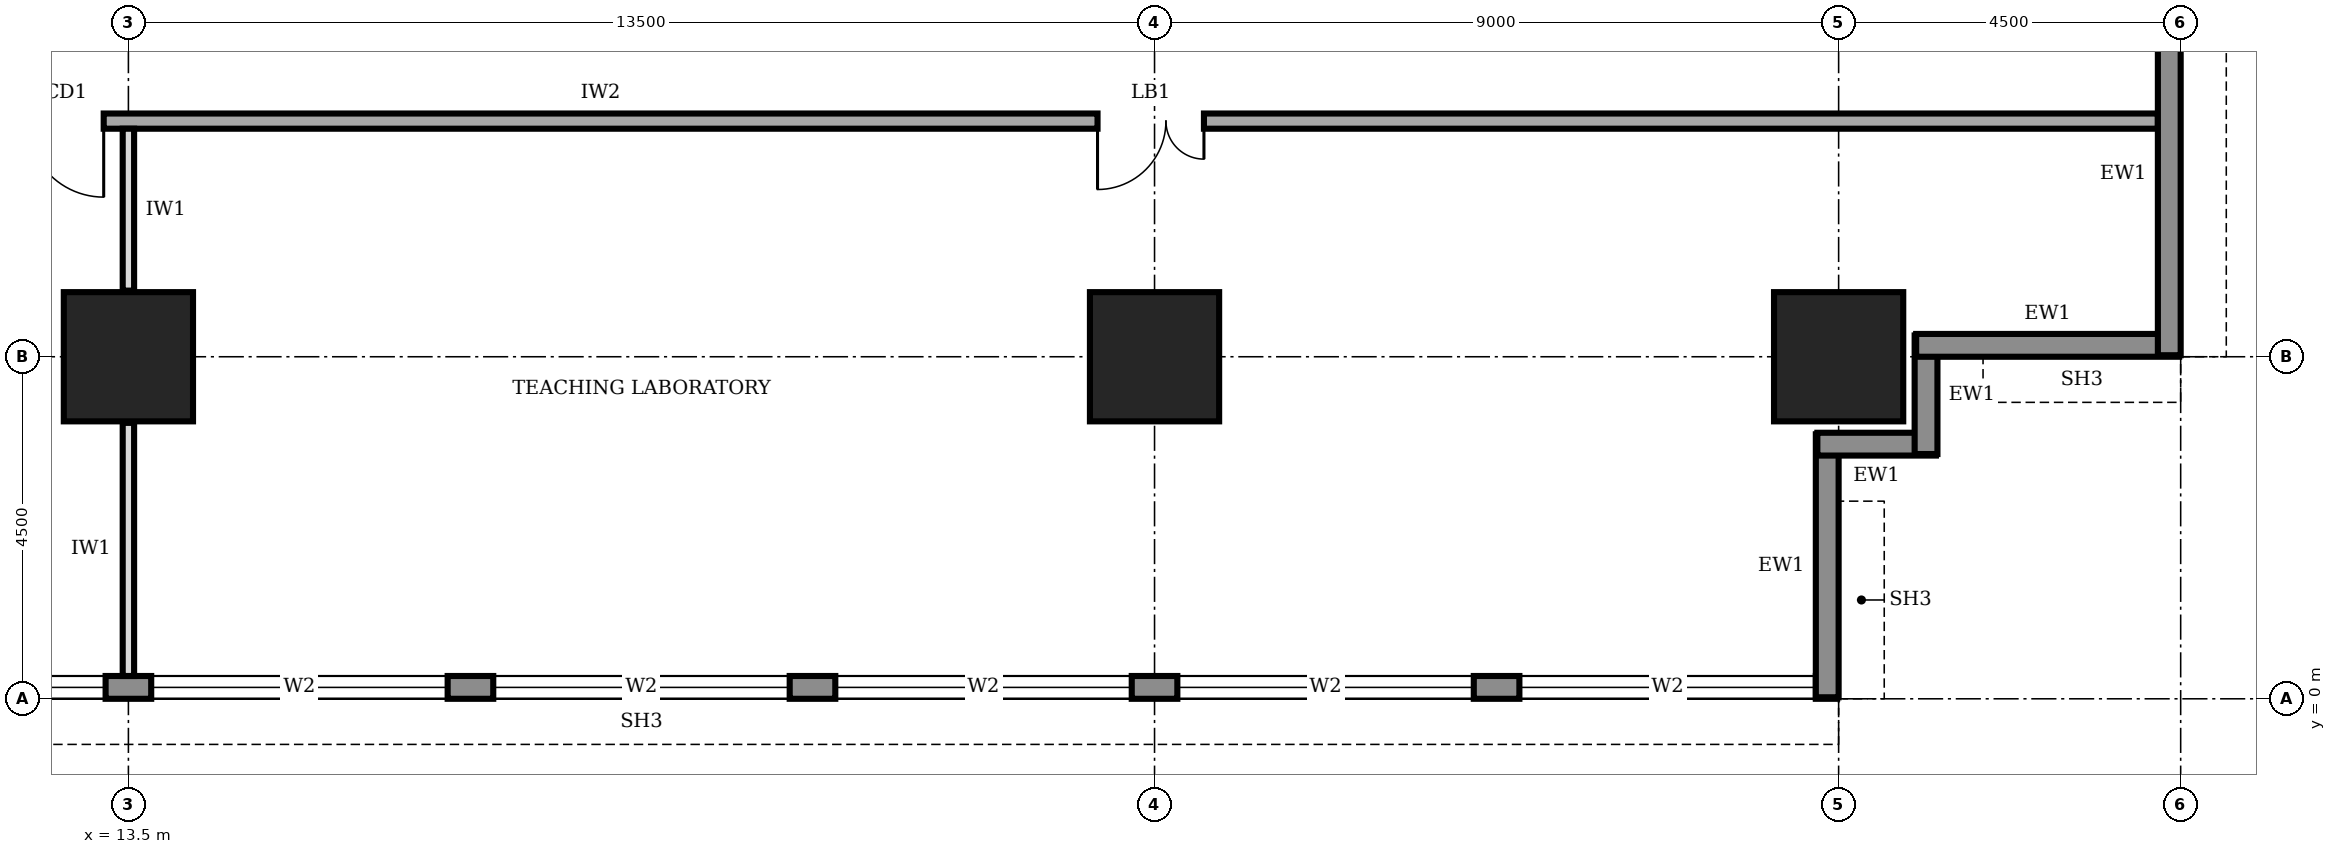
"""IFC4 building model, lengths in metres.
Left out: names, types, materials, properties, quantities, classifications, styles, units other than length and angle.
Written with IfcOpenShell. Run it as: python <this file> out.ifc"""

import sys

from ifc_helpers import new_model, si_unit, direction, frame, frame_2d, origin, origin_2d, place, context, subcontext, project, spatial, rectangle, extrude, element, fill, save


model = new_model("IFC4")
c1 = context("Model", 3, precision=1e-05, world=origin(), true_north=direction((0.0, 1.0)))
c2 = subcontext(c1, "Body", "Model", "MODEL_VIEW")
j1 = project(units=[si_unit("LENGTHUNIT", "METRE"), si_unit("PLANEANGLEUNIT", "RADIAN")], contexts=[c1])
p1 = place(None, origin())
s1 = spatial("IfcSite", under=j1, at=p1, CompositionType="ELEMENT")
p2 = place(p1, origin())
s2 = spatial("IfcBuilding", under=s1, at=p2, CompositionType="ELEMENT")
p3 = place(p2, frame((0.0, 0.0, 149.0)))
s3 = spatial("IfcBuildingStorey", under=s2, at=p3, CompositionType="ELEMENT", Elevation=149.0)
for number, where, z_axis, x_axis in (
    (1, (13.5, 4.5, 0.0), (0.0, 0.0, 1.0), (1.0, 0.0, 0.0)),
    (2, (27.0, 4.5, 0.0), (0.0, 0.0, 1.0), (1.0, 0.0, 0.0)),
    (3, (36.0, 4.5, 0.0), (0.0, 0.0, 1.0), (1.0, 0.0, 0.0)),
):
    element("IfcColumn", number, at=place(p3, frame(where, z_axis=z_axis, x_axis=x_axis)), inside=s3, PredefinedType="COLUMN", context=c2, shape_type="SweptSolid", body=[
        extrude(rectangle(XDim=1.7, YDim=1.7, at=origin_2d()), origin(), (0.0, 0.0, 1.0), 4.0),
    ])
p4 = place(p3, frame((4.52, 0.15, 0.0), z_axis=(0.0, 0.0, 1.0), x_axis=(1.0, 0.0, 0.0)))
e4 = element("IfcWall", 4, at=p4, inside=s3, PredefinedType="STANDARD", context=c2, shape_type="SweptSolid", body=[
    extrude(rectangle(XDim=31.46, YDim=0.3, at=frame_2d((15.73, 0.0))), origin(), (0.0, 0.0, 1.0), 3.75),
])
p5 = place(p4, frame((4.78, 0.0, 0.6)))
e5 = element("IfcOpeningElement", 5, at=p5, cuts=e4, PredefinedType="OPENING", context=c2, shape_type="SweptSolid", body=[
    extrude(rectangle(XDim=3.9, YDim=2.6, at=frame_2d((1.95, 1.3))), frame((0.0, 0.16, 0.0), z_axis=(0.0, -1.0, 0.0), x_axis=(1.0, 0.0, 0.0)), (0.0, 0.0, 1.0), 0.32),
])
p6 = place(p4, frame((9.28, 0.0, 0.6)))
e6 = element("IfcOpeningElement", 6, at=p6, cuts=e4, PredefinedType="OPENING", context=c2, shape_type="SweptSolid", body=[
    extrude(rectangle(XDim=3.9, YDim=2.6, at=frame_2d((1.95, 1.3))), frame((0.0, 0.16, 0.0), z_axis=(0.0, -1.0, 0.0), x_axis=(1.0, 0.0, 0.0)), (0.0, 0.0, 1.0), 0.32),
])
p7 = place(p4, frame((13.78, 0.0, 0.6)))
e7 = element("IfcOpeningElement", 7, at=p7, cuts=e4, PredefinedType="OPENING", context=c2, shape_type="SweptSolid", body=[
    extrude(rectangle(XDim=3.9, YDim=2.6, at=frame_2d((1.95, 1.3))), frame((0.0, 0.16, 0.0), z_axis=(0.0, -1.0, 0.0), x_axis=(1.0, 0.0, 0.0)), (0.0, 0.0, 1.0), 0.32),
])
p8 = place(p4, frame((18.28, 0.0, 0.6)))
e8 = element("IfcOpeningElement", 8, at=p8, cuts=e4, PredefinedType="OPENING", context=c2, shape_type="SweptSolid", body=[
    extrude(rectangle(XDim=3.9, YDim=2.6, at=frame_2d((1.95, 1.3))), frame((0.0, 0.16, 0.0), z_axis=(0.0, -1.0, 0.0), x_axis=(1.0, 0.0, 0.0)), (0.0, 0.0, 1.0), 0.32),
])
p9 = place(p4, frame((22.78, 0.0, 0.6)))
e9 = element("IfcOpeningElement", 9, at=p9, cuts=e4, PredefinedType="OPENING", context=c2, shape_type="SweptSolid", body=[
    extrude(rectangle(XDim=3.9, YDim=2.6, at=frame_2d((1.95, 1.3))), frame((0.0, 0.16, 0.0), z_axis=(0.0, -1.0, 0.0), x_axis=(1.0, 0.0, 0.0)), (0.0, 0.0, 1.0), 0.32),
])
p10 = place(p4, frame((27.28, 0.0, 0.6)))
e10 = element("IfcOpeningElement", 10, at=p10, cuts=e4, PredefinedType="OPENING", context=c2, shape_type="SweptSolid", body=[
    extrude(rectangle(XDim=3.9, YDim=2.6, at=frame_2d((1.95, 1.3))), frame((0.0, 0.16, 0.0), z_axis=(0.0, -1.0, 0.0), x_axis=(1.0, 0.0, 0.0)), (0.0, 0.0, 1.0), 0.32),
])
p11 = place(p3, frame((35.85, 0.02, 0.0), z_axis=(0.0, 0.0, 1.0), x_axis=(0.0, 1.0, 0.0)))
e11 = element("IfcWall", 11, at=p11, inside=s3, PredefinedType="STANDARD", context=c2, shape_type="SweptSolid", body=[
    extrude(rectangle(XDim=3.46, YDim=0.3, at=frame_2d((1.73, 0.0))), origin(), (0.0, 0.0, 1.0), 2.85),
])
for number, where, z_axis, x_axis in (
    (12, (35.72, 3.35, 0.0), (0.0, 0.0, 1.0), (1.0, 0.0, 0.0)),
    (13, (37.15, 3.22, 0.0), (0.0, 0.0, 1.0), (0.0, 1.0, 0.0)),
):
    element("IfcWall", number, at=place(p3, frame(where, z_axis=z_axis, x_axis=x_axis)), inside=s3, PredefinedType="STANDARD", context=c2, shape_type="SweptSolid", body=[
        extrude(rectangle(XDim=1.56, YDim=0.3, at=frame_2d((0.78, 0.0))), origin(), (0.0, 0.0, 1.0), 3.75),
    ])
p12 = place(p3, frame((37.02, 4.65, 0.0), z_axis=(0.0, 0.0, 1.0), x_axis=(1.0, 0.0, 0.0)))
e14 = element("IfcWall", 14, at=p12, inside=s3, PredefinedType="STANDARD", context=c2, shape_type="SweptSolid", body=[
    extrude(rectangle(XDim=3.46, YDim=0.3, at=frame_2d((1.73, 0.0))), origin(), (0.0, 0.0, 1.0), 2.85),
])
p13 = place(p3, frame((40.35, 4.52, 0.0), z_axis=(0.0, 0.0, 1.0), x_axis=(0.0, 1.0, 0.0)))
e15 = element("IfcWall", 15, at=p13, inside=s3, PredefinedType="STANDARD", context=c2, shape_type="SweptSolid", body=[
    extrude(rectangle(XDim=31.46, YDim=0.3, at=frame_2d((15.73, 0.0))), origin(), (0.0, 0.0, 1.0), 3.75),
])
p14 = place(p13, frame((4.78, 0.0, 0.6)))
e16 = element("IfcOpeningElement", 16, at=p14, cuts=e15, PredefinedType="OPENING", context=c2, shape_type="SweptSolid", body=[
    extrude(rectangle(XDim=3.9, YDim=2.6, at=frame_2d((1.95, 1.3))), frame((0.0, 0.16, 0.0), z_axis=(0.0, -1.0, 0.0), x_axis=(1.0, 0.0, 0.0)), (0.0, 0.0, 1.0), 0.32),
])
p15 = place(p13, frame((9.28, 0.0, 0.6)))
e17 = element("IfcOpeningElement", 17, at=p15, cuts=e15, PredefinedType="OPENING", context=c2, shape_type="SweptSolid", body=[
    extrude(rectangle(XDim=3.9, YDim=2.6, at=frame_2d((1.95, 1.3))), frame((0.0, 0.16, 0.0), z_axis=(0.0, -1.0, 0.0), x_axis=(1.0, 0.0, 0.0)), (0.0, 0.0, 1.0), 0.32),
])
p16 = place(p13, frame((13.78, 0.0, 0.6)))
e18 = element("IfcOpeningElement", 18, at=p16, cuts=e15, PredefinedType="OPENING", context=c2, shape_type="SweptSolid", body=[
    extrude(rectangle(XDim=3.9, YDim=2.6, at=frame_2d((1.95, 1.3))), frame((0.0, 0.16, 0.0), z_axis=(0.0, -1.0, 0.0), x_axis=(1.0, 0.0, 0.0)), (0.0, 0.0, 1.0), 0.32),
])
p17 = place(p13, frame((18.28, 0.0, 0.6)))
e19 = element("IfcOpeningElement", 19, at=p17, cuts=e15, PredefinedType="OPENING", context=c2, shape_type="SweptSolid", body=[
    extrude(rectangle(XDim=3.9, YDim=2.6, at=frame_2d((1.95, 1.3))), frame((0.0, 0.16, 0.0), z_axis=(0.0, -1.0, 0.0), x_axis=(1.0, 0.0, 0.0)), (0.0, 0.0, 1.0), 0.32),
])
p18 = place(p13, frame((22.78, 0.0, 0.6)))
e20 = element("IfcOpeningElement", 20, at=p18, cuts=e15, PredefinedType="OPENING", context=c2, shape_type="SweptSolid", body=[
    extrude(rectangle(XDim=3.9, YDim=2.6, at=frame_2d((1.95, 1.3))), frame((0.0, 0.16, 0.0), z_axis=(0.0, -1.0, 0.0), x_axis=(1.0, 0.0, 0.0)), (0.0, 0.0, 1.0), 0.32),
])
p19 = place(p13, frame((27.28, 0.0, 0.6)))
e21 = element("IfcOpeningElement", 21, at=p19, cuts=e15, PredefinedType="OPENING", context=c2, shape_type="SweptSolid", body=[
    extrude(rectangle(XDim=3.9, YDim=2.6, at=frame_2d((1.95, 1.3))), frame((0.0, 0.16, 0.0), z_axis=(0.0, -1.0, 0.0), x_axis=(1.0, 0.0, 0.0)), (0.0, 0.0, 1.0), 0.32),
])
p20 = place(p3, frame((11.9, 7.6, 0.0), z_axis=(0.0, 0.0, 1.0), x_axis=(1.0, 0.0, 0.0)))
e22 = element("IfcWall", 22, at=p20, inside=s3, PredefinedType="SOLIDWALL", context=c2, shape_type="SweptSolid", body=[
    extrude(rectangle(XDim=28.3, YDim=0.2, at=frame_2d((14.15, 0.0))), origin(), (0.0, 0.0, 1.0), 3.75),
])
p21 = place(p20, frame((0.275, 0.0, 0.0)))
e23 = element("IfcOpeningElement", 23, at=p21, cuts=e22, PredefinedType="OPENING", context=c2, shape_type="SweptSolid", body=[
    extrude(rectangle(XDim=1.0, YDim=2.1, at=frame_2d((0.5, 1.05))), frame((0.0, 0.11, 0.0), z_axis=(0.0, -1.0, 0.0), x_axis=(1.0, 0.0, 0.0)), (0.0, 0.0, 1.0), 0.22),
])
p22 = place(p20, frame((14.35, 0.0, 0.0)))
e24 = element("IfcOpeningElement", 24, at=p22, cuts=e22, PredefinedType="OPENING", context=c2, shape_type="SweptSolid", body=[
    extrude(rectangle(XDim=1.4, YDim=2.1, at=frame_2d((0.7, 1.05))), frame((0.0, 0.11, 0.0), z_axis=(0.0, -1.0, 0.0), x_axis=(1.0, 0.0, 0.0)), (0.0, 0.0, 1.0), 0.22),
])
p23 = place(p3, frame((13.5, 0.3, 0.0), z_axis=(0.0, 0.0, 1.0), x_axis=(0.0, 1.0, 0.0)))
e25 = element("IfcWall", 25, at=p23, inside=s3, PredefinedType="PARTITIONING", context=c2, shape_type="SweptSolid", body=[
    extrude(rectangle(XDim=3.33, YDim=0.15, at=frame_2d((1.665, 0.0))), origin(), (0.0, 0.0, 1.0), 2.85),
])
p24 = place(p3, frame((13.5, 5.37, 0.0), z_axis=(0.0, 0.0, 1.0), x_axis=(0.0, 1.0, 0.0)))
e26 = element("IfcWall", 26, at=p24, inside=s3, PredefinedType="PARTITIONING", context=c2, shape_type="SweptSolid", body=[
    extrude(rectangle(XDim=2.13, YDim=0.15, at=frame_2d((1.065, 0.0))), origin(), (0.0, 0.0, 1.0), 2.85),
])
p25 = place(p5, origin())
e27 = element("IfcWindow", 27, at=p25, inside=s3, PartitioningType="SINGLE_PANEL", PredefinedType="WINDOW", context=c2, shape_type="SweptSolid", body=[
    extrude(rectangle(XDim=3.9, YDim=2.6, at=frame_2d((1.95, 1.3))), frame((0.0, 0.03, 0.0), z_axis=(0.0, -1.0, 0.0), x_axis=(1.0, 0.0, 0.0)), (0.0, 0.0, 1.0), 0.06),
])
fill(e5, e27)
p26 = place(p6, origin())
e28 = element("IfcWindow", 28, at=p26, inside=s3, PartitioningType="SINGLE_PANEL", PredefinedType="WINDOW", context=c2, shape_type="SweptSolid", body=[
    extrude(rectangle(XDim=3.9, YDim=2.6, at=frame_2d((1.95, 1.3))), frame((0.0, 0.03, 0.0), z_axis=(0.0, -1.0, 0.0), x_axis=(1.0, 0.0, 0.0)), (0.0, 0.0, 1.0), 0.06),
])
fill(e6, e28)
p27 = place(p7, origin())
e29 = element("IfcWindow", 29, at=p27, inside=s3, PartitioningType="SINGLE_PANEL", PredefinedType="WINDOW", context=c2, shape_type="SweptSolid", body=[
    extrude(rectangle(XDim=3.9, YDim=2.6, at=frame_2d((1.95, 1.3))), frame((0.0, 0.03, 0.0), z_axis=(0.0, -1.0, 0.0), x_axis=(1.0, 0.0, 0.0)), (0.0, 0.0, 1.0), 0.06),
])
fill(e7, e29)
p28 = place(p8, origin())
e30 = element("IfcWindow", 30, at=p28, inside=s3, PartitioningType="SINGLE_PANEL", PredefinedType="WINDOW", context=c2, shape_type="SweptSolid", body=[
    extrude(rectangle(XDim=3.9, YDim=2.6, at=frame_2d((1.95, 1.3))), frame((0.0, 0.03, 0.0), z_axis=(0.0, -1.0, 0.0), x_axis=(1.0, 0.0, 0.0)), (0.0, 0.0, 1.0), 0.06),
])
fill(e8, e30)
p29 = place(p9, origin())
e31 = element("IfcWindow", 31, at=p29, inside=s3, PartitioningType="SINGLE_PANEL", PredefinedType="WINDOW", context=c2, shape_type="SweptSolid", body=[
    extrude(rectangle(XDim=3.9, YDim=2.6, at=frame_2d((1.95, 1.3))), frame((0.0, 0.03, 0.0), z_axis=(0.0, -1.0, 0.0), x_axis=(1.0, 0.0, 0.0)), (0.0, 0.0, 1.0), 0.06),
])
fill(e9, e31)
p30 = place(p10, origin())
e32 = element("IfcWindow", 32, at=p30, inside=s3, PartitioningType="SINGLE_PANEL", PredefinedType="WINDOW", context=c2, shape_type="SweptSolid", body=[
    extrude(rectangle(XDim=3.9, YDim=2.6, at=frame_2d((1.95, 1.3))), frame((0.0, 0.03, 0.0), z_axis=(0.0, -1.0, 0.0), x_axis=(1.0, 0.0, 0.0)), (0.0, 0.0, 1.0), 0.06),
])
fill(e10, e32)
p31 = place(p21, frame((1.0, 0.0, 0.0), z_axis=(0.0, 0.0, 1.0), x_axis=(-1.0, 0.0, 0.0)))
e33 = element("IfcDoor", 33, at=p31, inside=s3, OperationType="SINGLE_SWING_LEFT", PredefinedType="DOOR", context=c2, shape_type="SweptSolid", body=[
    extrude(rectangle(XDim=1.0, YDim=2.1, at=frame_2d((0.5, 1.05))), frame((0.0, 0.025, 0.0), z_axis=(0.0, -1.0, 0.0), x_axis=(1.0, 0.0, 0.0)), (0.0, 0.0, 1.0), 0.05),
])
fill(e23, e33)
p32 = place(p22, frame((1.4, 0.0, 0.0), z_axis=(0.0, 0.0, 1.0), x_axis=(-1.0, 0.0, 0.0)))
e34 = element("IfcDoor", 34, at=p32, inside=s3, OperationType="DOUBLE_DOOR_SINGLE_SWING", PredefinedType="DOOR", context=c2, shape_type="SweptSolid", body=[
    extrude(rectangle(XDim=1.4, YDim=2.1, at=frame_2d((0.7, 1.05))), frame((0.0, 0.025, 0.0), z_axis=(0.0, -1.0, 0.0), x_axis=(1.0, 0.0, 0.0)), (0.0, 0.0, 1.0), 0.05),
])
fill(e24, e34)
save(model, sys.argv[1])
